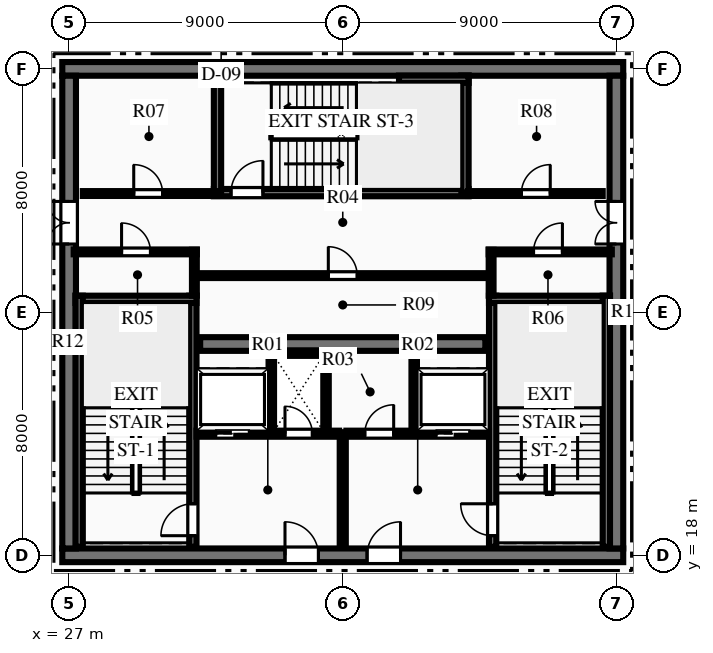
"""IFC4 building model, lengths in metres.
Left out: names, types, materials, properties, quantities, classifications, styles, units other than length and angle.
Written with IfcOpenShell. Run it as: python <this file> out.ifc"""

import sys

from ifc_helpers import new_model, si_unit, direction, frame, frame_2d, origin, place, context, subcontext, project, spatial, rectangle, extrude, element, fill, save


model = new_model("IFC4")
c1 = context("Model", 3, precision=1e-05, world=origin(), true_north=direction((0.0, 1.0)))
c2 = subcontext(c1, "Body", "Model", "MODEL_VIEW")
j1 = project(units=[si_unit("LENGTHUNIT", "METRE"), si_unit("PLANEANGLEUNIT", "RADIAN")], contexts=[c1])
p1 = place(None, origin())
s1 = spatial("IfcSite", under=j1, at=p1, CompositionType="ELEMENT")
p2 = place(p1, origin())
s2 = spatial("IfcBuilding", under=s1, at=p2, CompositionType="ELEMENT")
p3 = place(p2, frame((0.0, 0.0, 367.8)))
s3 = spatial("IfcBuildingStorey", under=s2, at=p3, CompositionType="ELEMENT", Elevation=367.8)
p4 = place(p3, frame((26.775, 18.0, 0.0), z_axis=(0.0, 0.0, 1.0), x_axis=(1.0, 0.0, 0.0)))
e1 = element("IfcWall", 1, at=p4, inside=s3, PredefinedType="SHEAR", context=c2, shape_type="SweptSolid", body=[
    extrude(rectangle(XDim=18.45, YDim=0.45, at=frame_2d((9.225, 0.0))), origin(), (0.0, 0.0, 1.0), 3.6),
])
p5 = place(p4, frame((7.325, 0.0, 0.0)))
e2 = element("IfcOpeningElement", 2, at=p5, cuts=e1, PredefinedType="OPENING", context=c2, shape_type="SweptSolid", body=[
    extrude(rectangle(XDim=1.1, YDim=2.15, at=frame_2d((0.55, 1.075))), frame((0.0, 0.235, 0.0), z_axis=(0.0, -1.0, 0.0), x_axis=(1.0, 0.0, 0.0)), (0.0, 0.0, 1.0), 0.47),
])
p6 = place(p4, frame((10.025, 0.0, 0.0)))
e3 = element("IfcOpeningElement", 3, at=p6, cuts=e1, PredefinedType="OPENING", context=c2, shape_type="SweptSolid", body=[
    extrude(rectangle(XDim=1.1, YDim=2.15, at=frame_2d((0.55, 1.075))), frame((0.0, 0.235, 0.0), z_axis=(0.0, -1.0, 0.0), x_axis=(1.0, 0.0, 0.0)), (0.0, 0.0, 1.0), 0.47),
])
p7 = place(p3, frame((26.775, 34.0, 0.0), z_axis=(0.0, 0.0, 1.0), x_axis=(1.0, 0.0, 0.0)))
e4 = element("IfcWall", 4, at=p7, inside=s3, PredefinedType="SHEAR", context=c2, shape_type="SweptSolid", body=[
    extrude(rectangle(XDim=18.45, YDim=0.45, at=frame_2d((9.225, 0.0))), origin(), (0.0, 0.0, 1.0), 3.6),
])
p8 = place(p3, frame((27.0, 18.225, 0.0), z_axis=(0.0, 0.0, 1.0), x_axis=(0.0, 1.0, 0.0)))
e5 = element("IfcWall", 5, at=p8, inside=s3, PredefinedType="SHEAR", context=c2, shape_type="SweptSolid", body=[
    extrude(rectangle(XDim=15.55, YDim=0.45, at=frame_2d((7.775, 0.0))), origin(), (0.0, 0.0, 1.0), 3.6),
])
p9 = place(p8, frame((10.015, 0.0, 0.0)))
e6 = element("IfcOpeningElement", 6, at=p9, cuts=e5, PredefinedType="OPENING", context=c2, shape_type="SweptSolid", body=[
    extrude(rectangle(XDim=1.4, YDim=2.2, at=frame_2d((0.7, 1.1))), frame((0.0, 0.235, 0.0), z_axis=(0.0, -1.0, 0.0), x_axis=(1.0, 0.0, 0.0)), (0.0, 0.0, 1.0), 0.47),
])
p10 = place(p3, frame((45.0, 18.225, 0.0), z_axis=(0.0, 0.0, 1.0), x_axis=(0.0, 1.0, 0.0)))
e7 = element("IfcWall", 7, at=p10, inside=s3, PredefinedType="SHEAR", context=c2, shape_type="SweptSolid", body=[
    extrude(rectangle(XDim=15.55, YDim=0.45, at=frame_2d((7.775, 0.0))), origin(), (0.0, 0.0, 1.0), 3.6),
])
p11 = place(p10, frame((10.015, 0.0, 0.0)))
e8 = element("IfcOpeningElement", 8, at=p11, cuts=e7, PredefinedType="OPENING", context=c2, shape_type="SweptSolid", body=[
    extrude(rectangle(XDim=1.4, YDim=2.2, at=frame_2d((0.7, 1.1))), frame((0.0, 0.235, 0.0), z_axis=(0.0, -1.0, 0.0), x_axis=(1.0, 0.0, 0.0)), (0.0, 0.0, 1.0), 0.47),
])
p12 = place(p3, frame((31.31, 24.95, 0.0), z_axis=(0.0, 0.0, 1.0), x_axis=(1.0, 0.0, 0.0)))
e9 = element("IfcWall", 9, at=p12, inside=s3, PredefinedType="SHEAR", context=c2, shape_type="SweptSolid", body=[
    extrude(rectangle(XDim=9.38, YDim=0.45, at=frame_2d((4.69, 0.0))), origin(), (0.0, 0.0, 1.0), 3.6),
])
p13 = place(p3, frame((31.07, 18.28, 0.0), z_axis=(0.0, 0.0, 1.0), x_axis=(0.0, 1.0, 0.0)))
e10 = element("IfcWall", 10, at=p13, inside=s3, PredefinedType="SHEAR", context=c2, shape_type="SweptSolid", body=[
    extrude(rectangle(XDim=8.26, YDim=0.24, at=frame_2d((4.13, 0.0))), origin(), (0.0, 0.0, 1.0), 3.6),
])
p14 = place(p13, frame((0.365, 0.0, 0.0)))
e11 = element("IfcOpeningElement", 11, at=p14, cuts=e10, PredefinedType="OPENING", context=c2, shape_type="SweptSolid", body=[
    extrude(rectangle(XDim=1.05, YDim=2.15, at=frame_2d((0.525, 1.075))), frame((0.0, 0.13, 0.0), z_axis=(0.0, -1.0, 0.0), x_axis=(1.0, 0.0, 0.0)), (0.0, 0.0, 1.0), 0.26),
])
p15 = place(p3, frame((27.21, 26.42, 0.0), z_axis=(0.0, 0.0, 1.0), x_axis=(1.0, 0.0, 0.0)))
e12 = element("IfcWall", 12, at=p15, inside=s3, PredefinedType="SHEAR", context=c2, shape_type="SweptSolid", body=[
    extrude(rectangle(XDim=3.98, YDim=0.24, at=frame_2d((1.99, 0.0))), origin(), (0.0, 0.0, 1.0), 3.6),
])
p16 = place(p3, frame((27.33, 18.28, 0.0), z_axis=(0.0, 0.0, 1.0), x_axis=(0.0, 1.0, 0.0)))
e13 = element("IfcWall", 13, at=p16, inside=s3, PredefinedType="SHEAR", context=c2, shape_type="SweptSolid", body=[
    extrude(rectangle(XDim=8.26, YDim=0.24, at=frame_2d((4.13, 0.0))), origin(), (0.0, 0.0, 1.0), 3.6),
])
p17 = place(p3, frame((40.93, 18.28, 0.0), z_axis=(0.0, 0.0, 1.0), x_axis=(0.0, 1.0, 0.0)))
e14 = element("IfcWall", 14, at=p17, inside=s3, PredefinedType="SHEAR", context=c2, shape_type="SweptSolid", body=[
    extrude(rectangle(XDim=8.26, YDim=0.24, at=frame_2d((4.13, 0.0))), origin(), (0.0, 0.0, 1.0), 3.6),
])
p18 = place(p17, frame((0.365, 0.0, 0.0)))
e15 = element("IfcOpeningElement", 15, at=p18, cuts=e14, PredefinedType="OPENING", context=c2, shape_type="SweptSolid", body=[
    extrude(rectangle(XDim=1.05, YDim=2.15, at=frame_2d((0.525, 1.075))), frame((0.0, 0.13, 0.0), z_axis=(0.0, -1.0, 0.0), x_axis=(1.0, 0.0, 0.0)), (0.0, 0.0, 1.0), 0.26),
])
p19 = place(p3, frame((40.81, 26.42, 0.0), z_axis=(0.0, 0.0, 1.0), x_axis=(1.0, 0.0, 0.0)))
e16 = element("IfcWall", 16, at=p19, inside=s3, PredefinedType="SHEAR", context=c2, shape_type="SweptSolid", body=[
    extrude(rectangle(XDim=3.98, YDim=0.24, at=frame_2d((1.99, 0.0))), origin(), (0.0, 0.0, 1.0), 3.6),
])
p20 = place(p3, frame((44.67, 18.28, 0.0), z_axis=(0.0, 0.0, 1.0), x_axis=(0.0, 1.0, 0.0)))
e17 = element("IfcWall", 17, at=p20, inside=s3, PredefinedType="SHEAR", context=c2, shape_type="SweptSolid", body=[
    extrude(rectangle(XDim=8.26, YDim=0.24, at=frame_2d((4.13, 0.0))), origin(), (0.0, 0.0, 1.0), 3.6),
])
p21 = place(p3, frame((31.76, 29.93, 0.0), z_axis=(0.0, 0.0, 1.0), x_axis=(1.0, 0.0, 0.0)))
e18 = element("IfcWall", 18, at=p21, inside=s3, PredefinedType="SHEAR", context=c2, shape_type="SweptSolid", body=[
    extrude(rectangle(XDim=8.38, YDim=0.24, at=frame_2d((4.19, 0.0))), origin(), (0.0, 0.0, 1.0), 3.6),
])
p22 = place(p21, frame((0.565, 0.0, 0.0)))
e19 = element("IfcOpeningElement", 19, at=p22, cuts=e18, PredefinedType="OPENING", context=c2, shape_type="SweptSolid", body=[
    extrude(rectangle(XDim=1.05, YDim=2.15, at=frame_2d((0.525, 1.075))), frame((0.0, 0.13, 0.0), z_axis=(0.0, -1.0, 0.0), x_axis=(1.0, 0.0, 0.0)), (0.0, 0.0, 1.0), 0.26),
])
p23 = place(p3, frame((31.88, 29.93, 0.0), z_axis=(0.0, 0.0, 1.0), x_axis=(0.0, 1.0, 0.0)))
e20 = element("IfcWall", 20, at=p23, inside=s3, PredefinedType="SHEAR", context=c2, shape_type="SweptSolid", body=[
    extrude(rectangle(XDim=3.79, YDim=0.24, at=frame_2d((1.895, 0.0))), origin(), (0.0, 0.0, 1.0), 3.6),
])
p24 = place(p3, frame((40.02, 29.93, 0.0), z_axis=(0.0, 0.0, 1.0), x_axis=(0.0, 1.0, 0.0)))
e21 = element("IfcWall", 21, at=p24, inside=s3, PredefinedType="SHEAR", context=c2, shape_type="SweptSolid", body=[
    extrude(rectangle(XDim=3.85, YDim=0.24, at=frame_2d((1.925, 0.0))), origin(), (0.0, 0.0, 1.0), 3.6),
])
p25 = place(p3, frame((37.85, 33.66, 0.0), z_axis=(0.0, 0.0, 1.0), x_axis=(1.0, 0.0, 0.0)))
e22 = element("IfcWall", 22, at=p25, inside=s3, PredefinedType="SHEAR", context=c2, shape_type="SweptSolid", body=[
    extrude(rectangle(XDim=2.29, YDim=0.24, at=frame_2d((1.145, 0.0))), origin(), (0.0, 0.0, 1.0), 3.6),
])
p26 = place(p3, frame((36.0, 18.28, 0.0), z_axis=(0.0, 0.0, 1.0), x_axis=(0.0, 1.0, 0.0)))
e23 = element("IfcWall", 23, at=p26, inside=s3, PredefinedType="PARTITIONING", context=c2, shape_type="SweptSolid", body=[
    extrude(rectangle(XDim=3.77, YDim=0.2, at=frame_2d((1.885, 0.0))), origin(), (0.0, 0.0, 1.0), 3.33),
])
p27 = place(p3, frame((31.19, 22.0, 0.0), z_axis=(0.0, 0.0, 1.0), x_axis=(1.0, 0.0, 0.0)))
e24 = element("IfcWall", 24, at=p27, inside=s3, PredefinedType="PARTITIONING", context=c2, shape_type="SweptSolid", body=[
    extrude(rectangle(XDim=4.69, YDim=0.2, at=frame_2d((2.345, 0.0))), origin(), (0.0, 0.0, 1.0), 3.33),
])
p28 = place(p27, frame((2.91, 0.0, 0.0)))
e25 = element("IfcOpeningElement", 25, at=p28, cuts=e24, PredefinedType="OPENING", context=c2, shape_type="SweptSolid", body=[
    extrude(rectangle(XDim=0.9, YDim=2.15, at=frame_2d((0.45, 1.075))), frame((0.0, 0.11, 0.0), z_axis=(0.0, -1.0, 0.0), x_axis=(1.0, 0.0, 0.0)), (0.0, 0.0, 1.0), 0.22),
])
p29 = place(p27, frame((0.635, 0.0, 0.0)))
e26 = element("IfcOpeningElement", 26, at=p29, cuts=e24, PredefinedType="OPENING", context=c2, shape_type="SweptSolid", body=[
    extrude(rectangle(XDim=1.1, YDim=2.15, at=frame_2d((0.55, 1.075))), frame((0.0, 0.11, 0.0), z_axis=(0.0, -1.0, 0.0), x_axis=(1.0, 0.0, 0.0)), (0.0, 0.0, 1.0), 0.22),
])
p30 = place(p3, frame((36.12, 22.0, 0.0), z_axis=(0.0, 0.0, 1.0), x_axis=(1.0, 0.0, 0.0)))
e27 = element("IfcWall", 27, at=p30, inside=s3, PredefinedType="PARTITIONING", context=c2, shape_type="SweptSolid", body=[
    extrude(rectangle(XDim=4.69, YDim=0.2, at=frame_2d((2.345, 0.0))), origin(), (0.0, 0.0, 1.0), 3.33),
])
p31 = place(p30, frame((0.605, 0.0, 0.0)))
e28 = element("IfcOpeningElement", 28, at=p31, cuts=e27, PredefinedType="OPENING", context=c2, shape_type="SweptSolid", body=[
    extrude(rectangle(XDim=0.95, YDim=2.15, at=frame_2d((0.475, 1.075))), frame((0.0, 0.11, 0.0), z_axis=(0.0, -1.0, 0.0), x_axis=(1.0, 0.0, 0.0)), (0.0, 0.0, 1.0), 0.22),
])
p32 = place(p30, frame((2.955, 0.0, 0.0)))
e29 = element("IfcOpeningElement", 29, at=p32, cuts=e27, PredefinedType="OPENING", context=c2, shape_type="SweptSolid", body=[
    extrude(rectangle(XDim=1.1, YDim=2.15, at=frame_2d((0.55, 1.075))), frame((0.0, 0.11, 0.0), z_axis=(0.0, -1.0, 0.0), x_axis=(1.0, 0.0, 0.0)), (0.0, 0.0, 1.0), 0.22),
])
for number, where, z_axis, x_axis in (
    (30, (33.65, 22.05, 0.0), (0.0, 0.0, 1.0), (0.0, 1.0, 0.0)),
    (31, (35.45, 22.05, 0.0), (0.0, 0.0, 1.0), (0.0, 1.0, 0.0)),
):
    element("IfcWall", number, at=place(p3, frame(where, z_axis=z_axis, x_axis=x_axis)), inside=s3, PredefinedType="PARTITIONING", context=c2, shape_type="SweptSolid", body=[
        extrude(rectangle(XDim=2.6, YDim=0.18, at=frame_2d((1.3, 0.0))), origin(), (0.0, 0.0, 1.0), 3.33),
    ])
p33 = place(p3, frame((33.65, 24.65, 0.0), z_axis=(0.0, 0.0, 1.0), x_axis=(1.0, 0.0, 0.0)))
e32 = element("IfcWall", 32, at=p33, inside=s3, PredefinedType="PARTITIONING", context=c2, shape_type="SweptSolid", body=[
    extrude(rectangle(XDim=1.8, YDim=0.18, at=frame_2d((0.9, 0.0))), origin(), (0.0, 0.0, 1.0), 3.33),
])
p34 = place(p3, frame((38.35, 22.05, 0.0), z_axis=(0.0, 0.0, 1.0), x_axis=(0.0, 1.0, 0.0)))
e33 = element("IfcWall", 33, at=p34, inside=s3, PredefinedType="PARTITIONING", context=c2, shape_type="SweptSolid", body=[
    extrude(rectangle(XDim=2.6, YDim=0.18, at=frame_2d((1.3, 0.0))), origin(), (0.0, 0.0, 1.0), 3.33),
])
p35 = place(p3, frame((27.15, 27.98, 0.0), z_axis=(0.0, 0.0, 1.0), x_axis=(1.0, 0.0, 0.0)))
e34 = element("IfcWall", 34, at=p35, inside=s3, PredefinedType="PARTITIONING", context=c2, shape_type="SweptSolid", body=[
    extrude(rectangle(XDim=4.05, YDim=0.16, at=frame_2d((2.025, 0.0))), origin(), (0.0, 0.0, 1.0), 3.33),
])
p36 = place(p35, frame((1.575, 0.0, 0.0)))
e35 = element("IfcOpeningElement", 35, at=p36, cuts=e34, PredefinedType="OPENING", context=c2, shape_type="SweptSolid", body=[
    extrude(rectangle(XDim=0.95, YDim=2.15, at=frame_2d((0.475, 1.075))), frame((0.0, 0.09, 0.0), z_axis=(0.0, -1.0, 0.0), x_axis=(1.0, 0.0, 0.0)), (0.0, 0.0, 1.0), 0.18),
])
p37 = place(p3, frame((31.12, 26.54, 0.0), z_axis=(0.0, 0.0, 1.0), x_axis=(0.0, 1.0, 0.0)))
e36 = element("IfcWall", 36, at=p37, inside=s3, PredefinedType="PARTITIONING", context=c2, shape_type="SweptSolid", body=[
    extrude(rectangle(XDim=1.51, YDim=0.16, at=frame_2d((0.755, 0.0))), origin(), (0.0, 0.0, 1.0), 3.33),
])
p38 = place(p3, frame((40.8, 27.98, 0.0), z_axis=(0.0, 0.0, 1.0), x_axis=(1.0, 0.0, 0.0)))
e37 = element("IfcWall", 37, at=p38, inside=s3, PredefinedType="PARTITIONING", context=c2, shape_type="SweptSolid", body=[
    extrude(rectangle(XDim=4.05, YDim=0.16, at=frame_2d((2.025, 0.0))), origin(), (0.0, 0.0, 1.0), 3.33),
])
p39 = place(p38, frame((1.475, 0.0, 0.0)))
e38 = element("IfcOpeningElement", 38, at=p39, cuts=e37, PredefinedType="OPENING", context=c2, shape_type="SweptSolid", body=[
    extrude(rectangle(XDim=0.95, YDim=2.15, at=frame_2d((0.475, 1.075))), frame((0.0, 0.09, 0.0), z_axis=(0.0, -1.0, 0.0), x_axis=(1.0, 0.0, 0.0)), (0.0, 0.0, 1.0), 0.18),
])
p40 = place(p3, frame((40.88, 26.54, 0.0), z_axis=(0.0, 0.0, 1.0), x_axis=(0.0, 1.0, 0.0)))
e39 = element("IfcWall", 39, at=p40, inside=s3, PredefinedType="PARTITIONING", context=c2, shape_type="SweptSolid", body=[
    extrude(rectangle(XDim=1.51, YDim=0.16, at=frame_2d((0.755, 0.0))), origin(), (0.0, 0.0, 1.0), 3.33),
])
p41 = place(p3, frame((27.45, 29.9, 0.0), z_axis=(0.0, 0.0, 1.0), x_axis=(1.0, 0.0, 0.0)))
e40 = element("IfcWall", 40, at=p41, inside=s3, PredefinedType="PARTITIONING", context=c2, shape_type="SweptSolid", body=[
    extrude(rectangle(XDim=4.43, YDim=0.16, at=frame_2d((2.215, 0.0))), origin(), (0.0, 0.0, 1.0), 3.33),
])
p42 = place(p41, frame((1.675, 0.0, 0.0)))
e41 = element("IfcOpeningElement", 41, at=p42, cuts=e40, PredefinedType="OPENING", context=c2, shape_type="SweptSolid", body=[
    extrude(rectangle(XDim=0.95, YDim=2.15, at=frame_2d((0.475, 1.075))), frame((0.0, 0.09, 0.0), z_axis=(0.0, -1.0, 0.0), x_axis=(1.0, 0.0, 0.0)), (0.0, 0.0, 1.0), 0.18),
])
p43 = place(p3, frame((40.12, 29.9, 0.0), z_axis=(0.0, 0.0, 1.0), x_axis=(1.0, 0.0, 0.0)))
e42 = element("IfcWall", 42, at=p43, inside=s3, PredefinedType="PARTITIONING", context=c2, shape_type="SweptSolid", body=[
    extrude(rectangle(XDim=4.43, YDim=0.16, at=frame_2d((2.215, 0.0))), origin(), (0.0, 0.0, 1.0), 3.33),
])
p44 = place(p43, frame((1.755, 0.0, 0.0)))
e43 = element("IfcOpeningElement", 43, at=p44, cuts=e42, PredefinedType="OPENING", context=c2, shape_type="SweptSolid", body=[
    extrude(rectangle(XDim=0.95, YDim=2.15, at=frame_2d((0.475, 1.075))), frame((0.0, 0.09, 0.0), z_axis=(0.0, -1.0, 0.0), x_axis=(1.0, 0.0, 0.0)), (0.0, 0.0, 1.0), 0.18),
])
p45 = place(p3, frame((31.2, 27.2, 0.0), z_axis=(0.0, 0.0, 1.0), x_axis=(1.0, 0.0, 0.0)))
e44 = element("IfcWall", 44, at=p45, inside=s3, PredefinedType="PARTITIONING", context=c2, shape_type="SweptSolid", body=[
    extrude(rectangle(XDim=9.6, YDim=0.16, at=frame_2d((4.8, 0.0))), origin(), (0.0, 0.0, 1.0), 3.33),
])
p46 = place(p45, frame((4.325, 0.0, 0.0)))
e45 = element("IfcOpeningElement", 45, at=p46, cuts=e44, PredefinedType="OPENING", context=c2, shape_type="SweptSolid", body=[
    extrude(rectangle(XDim=0.95, YDim=2.15, at=frame_2d((0.475, 1.075))), frame((0.0, 0.09, 0.0), z_axis=(0.0, -1.0, 0.0), x_axis=(1.0, 0.0, 0.0)), (0.0, 0.0, 1.0), 0.18),
])
p47 = place(p31, origin())
e46 = element("IfcDoor", 46, at=p47, inside=s3, OperationType="SINGLE_SWING_RIGHT", PredefinedType="DOOR", context=c2, shape_type="SweptSolid", body=[
    extrude(rectangle(XDim=0.95, YDim=2.15, at=frame_2d((0.475, 1.075))), frame((0.0, 0.025, 0.0), z_axis=(0.0, -1.0, 0.0), x_axis=(1.0, 0.0, 0.0)), (0.0, 0.0, 1.0), 0.05),
])
fill(e28, e46)
p48 = place(p36, origin())
e47 = element("IfcDoor", 47, at=p48, inside=s3, OperationType="SINGLE_SWING_LEFT", PredefinedType="DOOR", context=c2, shape_type="SweptSolid", body=[
    extrude(rectangle(XDim=0.95, YDim=2.15, at=frame_2d((0.475, 1.075))), frame((0.0, 0.025, 0.0), z_axis=(0.0, -1.0, 0.0), x_axis=(1.0, 0.0, 0.0)), (0.0, 0.0, 1.0), 0.05),
])
fill(e35, e47)
p49 = place(p39, origin())
e48 = element("IfcDoor", 48, at=p49, inside=s3, OperationType="SINGLE_SWING_RIGHT", PredefinedType="DOOR", context=c2, shape_type="SweptSolid", body=[
    extrude(rectangle(XDim=0.95, YDim=2.15, at=frame_2d((0.475, 1.075))), frame((0.0, 0.025, 0.0), z_axis=(0.0, -1.0, 0.0), x_axis=(1.0, 0.0, 0.0)), (0.0, 0.0, 1.0), 0.05),
])
fill(e38, e48)
p50 = place(p42, origin())
e49 = element("IfcDoor", 49, at=p50, inside=s3, OperationType="SINGLE_SWING_LEFT", PredefinedType="DOOR", context=c2, shape_type="SweptSolid", body=[
    extrude(rectangle(XDim=0.95, YDim=2.15, at=frame_2d((0.475, 1.075))), frame((0.0, 0.025, 0.0), z_axis=(0.0, -1.0, 0.0), x_axis=(1.0, 0.0, 0.0)), (0.0, 0.0, 1.0), 0.05),
])
fill(e41, e49)
p51 = place(p44, origin())
e50 = element("IfcDoor", 50, at=p51, inside=s3, OperationType="SINGLE_SWING_RIGHT", PredefinedType="DOOR", context=c2, shape_type="SweptSolid", body=[
    extrude(rectangle(XDim=0.95, YDim=2.15, at=frame_2d((0.475, 1.075))), frame((0.0, 0.025, 0.0), z_axis=(0.0, -1.0, 0.0), x_axis=(1.0, 0.0, 0.0)), (0.0, 0.0, 1.0), 0.05),
])
fill(e43, e50)
p52 = place(p46, origin())
e51 = element("IfcDoor", 51, at=p52, inside=s3, OperationType="SINGLE_SWING_LEFT", PredefinedType="DOOR", context=c2, shape_type="SweptSolid", body=[
    extrude(rectangle(XDim=0.95, YDim=2.15, at=frame_2d((0.475, 1.075))), frame((0.0, 0.025, 0.0), z_axis=(0.0, -1.0, 0.0), x_axis=(1.0, 0.0, 0.0)), (0.0, 0.0, 1.0), 0.05),
])
fill(e45, e51)
p53 = place(p14, origin())
e52 = element("IfcDoor", 52, at=p53, inside=s3, OperationType="SINGLE_SWING_LEFT", PredefinedType="DOOR", context=c2, shape_type="SweptSolid", body=[
    extrude(rectangle(XDim=1.05, YDim=2.15, at=frame_2d((0.525, 1.075))), frame((0.0, 0.025, 0.0), z_axis=(0.0, -1.0, 0.0), x_axis=(1.0, 0.0, 0.0)), (0.0, 0.0, 1.0), 0.05),
])
fill(e11, e52)
p54 = place(p18, origin())
e53 = element("IfcDoor", 53, at=p54, inside=s3, OperationType="SINGLE_SWING_RIGHT", PredefinedType="DOOR", context=c2, shape_type="SweptSolid", body=[
    extrude(rectangle(XDim=1.05, YDim=2.15, at=frame_2d((0.525, 1.075))), frame((0.0, 0.025, 0.0), z_axis=(0.0, -1.0, 0.0), x_axis=(1.0, 0.0, 0.0)), (0.0, 0.0, 1.0), 0.05),
])
fill(e15, e53)
p55 = place(p22, origin())
e54 = element("IfcDoor", 54, at=p55, inside=s3, OperationType="SINGLE_SWING_RIGHT", PredefinedType="DOOR", context=c2, shape_type="SweptSolid", body=[
    extrude(rectangle(XDim=1.05, YDim=2.15, at=frame_2d((0.525, 1.075))), frame((0.0, 0.025, 0.0), z_axis=(0.0, -1.0, 0.0), x_axis=(1.0, 0.0, 0.0)), (0.0, 0.0, 1.0), 0.05),
])
fill(e19, e54)
p56 = place(p5, origin())
e55 = element("IfcDoor", 55, at=p56, inside=s3, OperationType="SINGLE_SWING_LEFT", PredefinedType="DOOR", context=c2, shape_type="SweptSolid", body=[
    extrude(rectangle(XDim=1.1, YDim=2.15, at=frame_2d((0.55, 1.075))), frame((0.0, 0.025, 0.0), z_axis=(0.0, -1.0, 0.0), x_axis=(1.0, 0.0, 0.0)), (0.0, 0.0, 1.0), 0.05),
])
fill(e2, e55)
p57 = place(p6, origin())
e56 = element("IfcDoor", 56, at=p57, inside=s3, OperationType="SINGLE_SWING_RIGHT", PredefinedType="DOOR", context=c2, shape_type="SweptSolid", body=[
    extrude(rectangle(XDim=1.1, YDim=2.15, at=frame_2d((0.55, 1.075))), frame((0.0, 0.025, 0.0), z_axis=(0.0, -1.0, 0.0), x_axis=(1.0, 0.0, 0.0)), (0.0, 0.0, 1.0), 0.05),
])
fill(e3, e56)
p58 = place(p28, origin())
e57 = element("IfcDoor", 57, at=p58, inside=s3, OperationType="SINGLE_SWING_LEFT", PredefinedType="DOOR", context=c2, shape_type="SweptSolid", body=[
    extrude(rectangle(XDim=0.9, YDim=2.15, at=frame_2d((0.45, 1.075))), frame((0.0, 0.025, 0.0), z_axis=(0.0, -1.0, 0.0), x_axis=(1.0, 0.0, 0.0)), (0.0, 0.0, 1.0), 0.05),
])
fill(e25, e57)
p59 = place(p9, origin())
e58 = element("IfcDoor", 58, at=p59, inside=s3, OperationType="DOUBLE_DOOR_SINGLE_SWING", PredefinedType="DOOR", context=c2, shape_type="SweptSolid", body=[
    extrude(rectangle(XDim=1.4, YDim=2.2, at=frame_2d((0.7, 1.1))), frame((0.0, 0.025, 0.0), z_axis=(0.0, -1.0, 0.0), x_axis=(1.0, 0.0, 0.0)), (0.0, 0.0, 1.0), 0.05),
])
fill(e6, e58)
p60 = place(p11, origin())
e59 = element("IfcDoor", 59, at=p60, inside=s3, OperationType="DOUBLE_DOOR_SINGLE_SWING", PredefinedType="DOOR", context=c2, shape_type="SweptSolid", body=[
    extrude(rectangle(XDim=1.4, YDim=2.2, at=frame_2d((0.7, 1.1))), frame((0.0, 0.025, 0.0), z_axis=(0.0, -1.0, 0.0), x_axis=(1.0, 0.0, 0.0)), (0.0, 0.0, 1.0), 0.05),
])
fill(e8, e59)
p61 = place(p29, origin())
e60 = element("IfcDoor", 60, at=p61, inside=s3, OperationType="SLIDING_TO_LEFT", PredefinedType="DOOR", context=c2, shape_type="SweptSolid", body=[
    extrude(rectangle(XDim=1.1, YDim=2.15, at=frame_2d((0.55, 1.075))), frame((0.0, 0.025, 0.0), z_axis=(0.0, -1.0, 0.0), x_axis=(1.0, 0.0, 0.0)), (0.0, 0.0, 1.0), 0.05),
])
fill(e26, e60)
p62 = place(p32, origin())
e61 = element("IfcDoor", 61, at=p62, inside=s3, OperationType="SLIDING_TO_LEFT", PredefinedType="DOOR", context=c2, shape_type="SweptSolid", body=[
    extrude(rectangle(XDim=1.1, YDim=2.15, at=frame_2d((0.55, 1.075))), frame((0.0, 0.025, 0.0), z_axis=(0.0, -1.0, 0.0), x_axis=(1.0, 0.0, 0.0)), (0.0, 0.0, 1.0), 0.05),
])
fill(e29, e61)
save(model, sys.argv[1])
